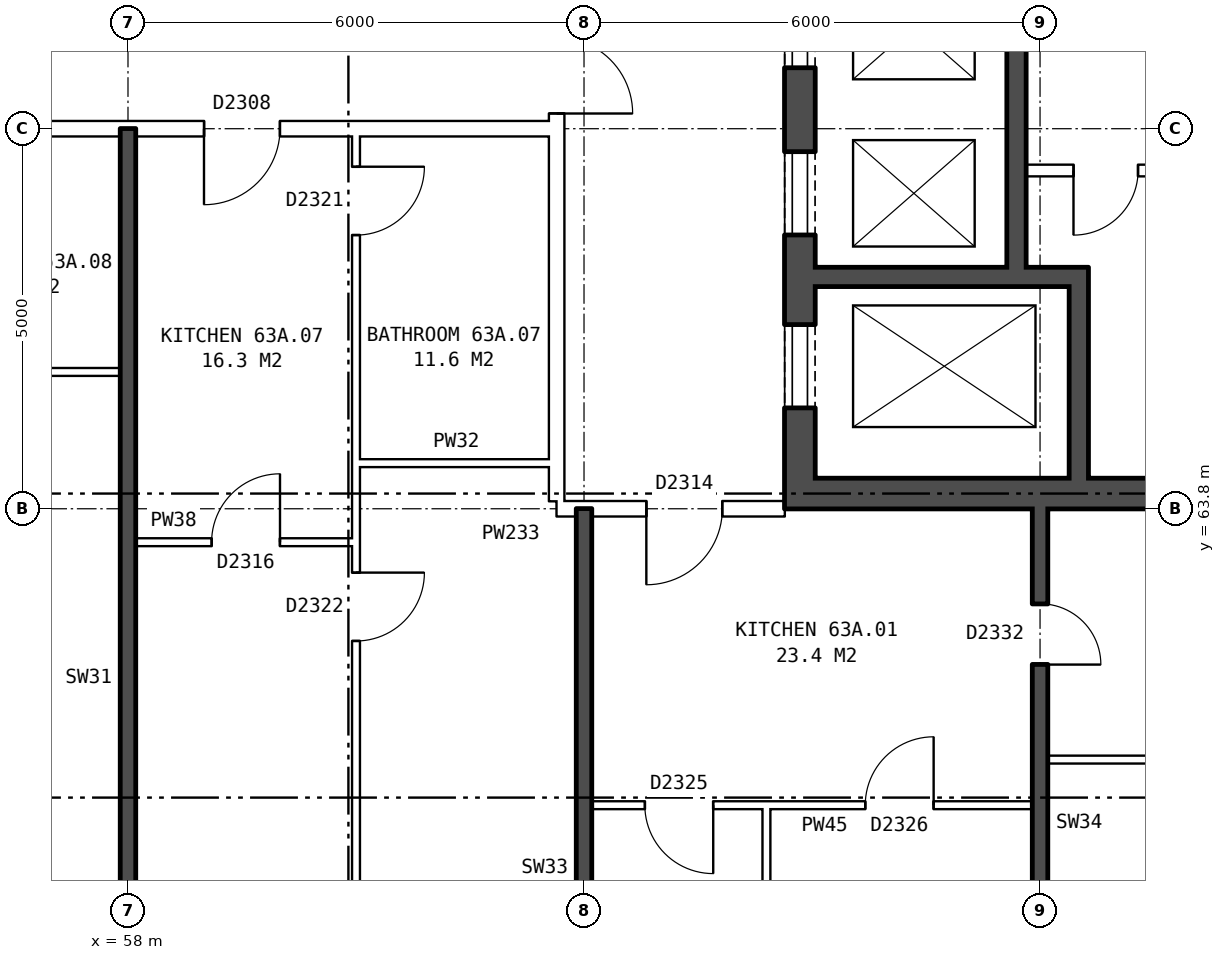
"""IFC4 building model, lengths in metres.
Left out: names, types, materials, properties, quantities, classifications, styles, units other than length and angle.
Written with IfcOpenShell. Run it as: python <this file> out.ifc"""

import sys

from ifc_helpers import new_model, si_unit, direction, frame, frame_2d, origin, place, context, subcontext, project, spatial, rectangle, extrude, element, fill, save


model = new_model("IFC4")
c1 = context("Model", 3, precision=1e-05, world=origin(), true_north=direction((0.0, 1.0)))
c2 = subcontext(c1, "Body", "Model", "MODEL_VIEW")
j1 = project(units=[si_unit("LENGTHUNIT", "METRE"), si_unit("PLANEANGLEUNIT", "RADIAN")], contexts=[c1])
p1 = place(None, origin())
s1 = spatial("IfcSite", under=j1, at=p1, CompositionType="ELEMENT")
p2 = place(p1, origin())
s2 = spatial("IfcBuilding", under=s1, at=p2, CompositionType="ELEMENT")
p3 = place(p2, frame((0.0, 0.0, 224.5)))
s3 = spatial("IfcBuildingStorey", under=s2, at=p3, CompositionType="ELEMENT", Elevation=224.5)
p4 = place(p3, frame((66.84, 63.8, 0.0), z_axis=(0.0, 0.0, 1.0), x_axis=(0.0, 1.0, 0.0)))
e1 = element("IfcWall", 1, at=p4, inside=s3, PredefinedType="SHEAR", context=c2, shape_type="SweptSolid", body=[
    extrude(rectangle(XDim=12.4, YDim=0.4, at=frame_2d((6.2, 0.0))), origin(), (0.0, 0.0, 1.0), 2.85),
])
p5 = place(p4, frame((1.325, 0.0, 0.0)))
e2 = element("IfcOpeningElement", 2, at=p5, cuts=e1, PredefinedType="OPENING", context=c2, shape_type="SweptSolid", body=[
    extrude(rectangle(XDim=1.1, YDim=2.1, at=frame_2d((0.55, 1.05))), frame((0.0, 0.21, 0.0), z_axis=(0.0, -1.0, 0.0), x_axis=(1.0, 0.0, 0.0)), (0.0, 0.0, 1.0), 0.42),
])
p6 = place(p4, frame((3.6, 0.0, 0.0)))
e3 = element("IfcOpeningElement", 3, at=p6, cuts=e1, PredefinedType="OPENING", context=c2, shape_type="SweptSolid", body=[
    extrude(rectangle(XDim=1.1, YDim=2.1, at=frame_2d((0.55, 1.05))), frame((0.0, 0.21, 0.0), z_axis=(0.0, -1.0, 0.0), x_axis=(1.0, 0.0, 0.0)), (0.0, 0.0, 1.0), 0.42),
])
p7 = place(p4, frame((5.8, 0.0, 0.0)))
e4 = element("IfcOpeningElement", 4, at=p7, cuts=e1, PredefinedType="OPENING", context=c2, shape_type="SweptSolid", body=[
    extrude(rectangle(XDim=1.1, YDim=2.1, at=frame_2d((0.55, 1.05))), frame((0.0, 0.21, 0.0), z_axis=(0.0, -1.0, 0.0), x_axis=(1.0, 0.0, 0.0)), (0.0, 0.0, 1.0), 0.42),
])
p8 = place(p4, frame((8.0, 0.0, 0.0)))
e5 = element("IfcOpeningElement", 5, at=p8, cuts=e1, PredefinedType="OPENING", context=c2, shape_type="SweptSolid", body=[
    extrude(rectangle(XDim=1.1, YDim=2.1, at=frame_2d((0.55, 1.05))), frame((0.0, 0.21, 0.0), z_axis=(0.0, -1.0, 0.0), x_axis=(1.0, 0.0, 0.0)), (0.0, 0.0, 1.0), 0.42),
])
p9 = place(p4, frame((9.9, 0.0, 0.0)))
e6 = element("IfcOpeningElement", 6, at=p9, cuts=e1, PredefinedType="OPENING", context=c2, shape_type="SweptSolid", body=[
    extrude(rectangle(XDim=1.1, YDim=2.1, at=frame_2d((0.55, 1.05))), frame((0.0, 0.21, 0.0), z_axis=(0.0, -1.0, 0.0), x_axis=(1.0, 0.0, 0.0)), (0.0, 0.0, 1.0), 0.42),
])
p10 = place(p3, frame((67.04, 64.0, 0.0), z_axis=(0.0, 0.0, 1.0), x_axis=(1.0, 0.0, 0.0)))
e7 = element("IfcWall", 7, at=p10, inside=s3, PredefinedType="SHEAR", context=c2, shape_type="SweptSolid", body=[
    extrude(rectangle(XDim=8.2, YDim=0.4, at=frame_2d((4.1, 0.0))), origin(), (0.0, 0.0, 1.0), 2.85),
])
p11 = place(p3, frame((67.04, 66.85, 0.0), z_axis=(0.0, 0.0, 1.0), x_axis=(1.0, 0.0, 0.0)))
e8 = element("IfcWall", 8, at=p11, inside=s3, PredefinedType="SHEAR", context=c2, shape_type="SweptSolid", body=[
    extrude(rectangle(XDim=3.595, YDim=0.25, at=frame_2d((1.797, 0.0))), origin(), (0.0, 0.0, 1.0), 2.85),
])
p12 = place(p3, frame((69.815, 68.25, 0.0), z_axis=(0.0, 0.0, 1.0), x_axis=(1.0, 0.0, 0.0)))
e9 = element("IfcWall", 9, at=p12, inside=s3, PredefinedType="PARTITIONING", context=c2, shape_type="SweptSolid", body=[
    extrude(rectangle(XDim=2.1, YDim=0.15, at=frame_2d((1.05, 0.0))), origin(), (0.0, 0.0, 1.0), 2.85),
])
p13 = place(p12, frame((0.625, 0.0, 0.0)))
e10 = element("IfcOpeningElement", 10, at=p13, cuts=e9, PredefinedType="OPENING", context=c2, shape_type="SweptSolid", body=[
    extrude(rectangle(XDim=0.85, YDim=2.1, at=frame_2d((0.425, 1.05))), frame((0.0, 0.085, 0.0), z_axis=(0.0, -1.0, 0.0), x_axis=(1.0, 0.0, 0.0)), (0.0, 0.0, 1.0), 0.17),
])
p14 = place(p3, frame((69.69, 66.975, 0.0), z_axis=(0.0, 0.0, 1.0), x_axis=(0.0, 1.0, 0.0)))
e11 = element("IfcWall", 11, at=p14, inside=s3, PredefinedType="SHEAR", context=c2, shape_type="SweptSolid", body=[
    extrude(rectangle(XDim=6.6, YDim=0.25, at=frame_2d((3.3, 0.0))), origin(), (0.0, 0.0, 1.0), 2.85),
])
p15 = place(p3, frame((70.51, 64.2, 0.0), z_axis=(0.0, 0.0, 1.0), x_axis=(0.0, 1.0, 0.0)))
e12 = element("IfcWall", 12, at=p15, inside=s3, PredefinedType="SHEAR", context=c2, shape_type="SweptSolid", body=[
    extrude(rectangle(XDim=2.525, YDim=0.25, at=frame_2d((1.263, 0.0))), origin(), (0.0, 0.0, 1.0), 2.85),
])
p16 = place(p3, frame((63.64, 63.9, 0.0), z_axis=(0.0, 0.0, 1.0), x_axis=(0.0, 1.0, 0.0)))
e13 = element("IfcWall", 13, at=p16, inside=s3, PredefinedType="PARTITIONING", context=c2, shape_type="SweptSolid", body=[
    extrude(rectangle(XDim=12.2, YDim=0.2, at=frame_2d((6.1, 0.0))), origin(), (0.0, 0.0, 1.0), 2.85),
])
p17 = place(p16, frame((5.1, 0.0, 0.0)))
e14 = element("IfcOpeningElement", 14, at=p17, cuts=e13, PredefinedType="OPENING", context=c2, shape_type="SweptSolid", body=[
    extrude(rectangle(XDim=2.0, YDim=2.1, at=frame_2d((1.0, 1.05))), frame((0.0, 0.11, 0.0), z_axis=(0.0, -1.0, 0.0), x_axis=(1.0, 0.0, 0.0)), (0.0, 0.0, 1.0), 0.22),
])
p18 = place(p3, frame((64.1, 59.9, 0.0), z_axis=(0.0, 0.0, 1.0), x_axis=(1.0, 0.0, 0.0)))
e15 = element("IfcWall", 15, at=p18, inside=s3, PredefinedType="PARTITIONING", context=c2, shape_type="SweptSolid", body=[
    extrude(rectangle(XDim=5.8, YDim=0.1, at=frame_2d((2.9, 0.0))), origin(), (0.0, 0.0, 1.0), 2.85),
])
p19 = place(p18, frame((3.6, 0.0, 0.0)))
e16 = element("IfcOpeningElement", 16, at=p19, cuts=e15, PredefinedType="OPENING", context=c2, shape_type="SweptSolid", body=[
    extrude(rectangle(XDim=0.9, YDim=2.1, at=frame_2d((0.45, 1.05))), frame((0.0, 0.06, 0.0), z_axis=(0.0, -1.0, 0.0), x_axis=(1.0, 0.0, 0.0)), (0.0, 0.0, 1.0), 0.12),
])
p20 = place(p18, frame((0.7, 0.0, 0.0)))
e17 = element("IfcOpeningElement", 17, at=p20, cuts=e15, PredefinedType="OPENING", context=c2, shape_type="SweptSolid", body=[
    extrude(rectangle(XDim=0.9, YDim=2.1, at=frame_2d((0.45, 1.05))), frame((0.0, 0.06, 0.0), z_axis=(0.0, -1.0, 0.0), x_axis=(1.0, 0.0, 0.0)), (0.0, 0.0, 1.0), 0.12),
])
p21 = place(p3, frame((70.1, 60.5, 0.0), z_axis=(0.0, 0.0, 1.0), x_axis=(1.0, 0.0, 0.0)))
e18 = element("IfcWall", 18, at=p21, inside=s3, PredefinedType="PARTITIONING", context=c2, shape_type="SweptSolid", body=[
    extrude(rectangle(XDim=5.8, YDim=0.1, at=frame_2d((2.9, 0.0))), origin(), (0.0, 0.0, 1.0), 2.85),
])
p22 = place(p3, frame((58.1, 63.36, 0.0), z_axis=(0.0, 0.0, 1.0), x_axis=(1.0, 0.0, 0.0)))
e19 = element("IfcWall", 19, at=p22, inside=s3, PredefinedType="PARTITIONING", context=c2, shape_type="SweptSolid", body=[
    extrude(rectangle(XDim=2.9, YDim=0.1, at=frame_2d((1.45, 0.0))), origin(), (0.0, 0.0, 1.0), 2.85),
])
p23 = place(p22, frame((1.0, 0.0, 0.0)))
e20 = element("IfcOpeningElement", 20, at=p23, cuts=e19, PredefinedType="OPENING", context=c2, shape_type="SweptSolid", body=[
    extrude(rectangle(XDim=0.9, YDim=2.1, at=frame_2d((0.45, 1.05))), frame((0.0, 0.06, 0.0), z_axis=(0.0, -1.0, 0.0), x_axis=(1.0, 0.0, 0.0)), (0.0, 0.0, 1.0), 0.12),
])
p24 = place(p3, frame((63.64, 63.8, 0.0), z_axis=(0.0, 0.0, 1.0), x_axis=(1.0, 0.0, 0.0)))
e21 = element("IfcWall", 21, at=p24, inside=s3, PredefinedType="PARTITIONING", context=c2, shape_type="SweptSolid", body=[
    extrude(rectangle(XDim=3.0, YDim=0.2, at=frame_2d((1.5, 0.0))), origin(), (0.0, 0.0, 1.0), 2.85),
])
p25 = place(p24, frame((1.18, 0.0, 0.0)))
e22 = element("IfcOpeningElement", 22, at=p25, cuts=e21, PredefinedType="OPENING", context=c2, shape_type="SweptSolid", body=[
    extrude(rectangle(XDim=1.0, YDim=2.1, at=frame_2d((0.5, 1.05))), frame((0.0, 0.11, 0.0), z_axis=(0.0, -1.0, 0.0), x_axis=(1.0, 0.0, 0.0)), (0.0, 0.0, 1.0), 0.22),
])
p26 = place(p3, frame((61.0, 64.4, 0.0), z_axis=(0.0, 0.0, 1.0), x_axis=(1.0, 0.0, 0.0)))
e23 = element("IfcWall", 23, at=p26, inside=s3, PredefinedType="PARTITIONING", context=c2, shape_type="SweptSolid", body=[
    extrude(rectangle(XDim=2.64, YDim=0.1, at=frame_2d((1.32, 0.0))), origin(), (0.0, 0.0, 1.0), 2.85),
])
p27 = place(p3, frame((55.0, 65.6, 0.0), z_axis=(0.0, 0.0, 1.0), x_axis=(1.0, 0.0, 0.0)))
e24 = element("IfcWall", 24, at=p27, inside=s3, PredefinedType="PARTITIONING", context=c2, shape_type="SweptSolid", body=[
    extrude(rectangle(XDim=2.9, YDim=0.1, at=frame_2d((1.45, 0.0))), origin(), (0.0, 0.0, 1.0), 2.85),
])
p28 = place(p3, frame((44.36, 68.8, 0.0), z_axis=(0.0, 0.0, 1.0), x_axis=(1.0, 0.0, 0.0)))
e25 = element("IfcWall", 25, at=p28, inside=s3, PredefinedType="PARTITIONING", context=c2, shape_type="SweptSolid", body=[
    extrude(rectangle(XDim=19.28, YDim=0.2, at=frame_2d((9.64, 0.0))), origin(), (0.0, 0.0, 1.0), 2.85),
])
p29 = place(p28, frame((14.64, 0.0, 0.0)))
e26 = element("IfcOpeningElement", 26, at=p29, cuts=e25, PredefinedType="OPENING", context=c2, shape_type="SweptSolid", body=[
    extrude(rectangle(XDim=1.0, YDim=2.1, at=frame_2d((0.5, 1.05))), frame((0.0, 0.11, 0.0), z_axis=(0.0, -1.0, 0.0), x_axis=(1.0, 0.0, 0.0)), (0.0, 0.0, 1.0), 0.22),
])
p30 = place(p28, frame((8.64, 0.0, 0.0)))
e27 = element("IfcOpeningElement", 27, at=p30, cuts=e25, PredefinedType="OPENING", context=c2, shape_type="SweptSolid", body=[
    extrude(rectangle(XDim=1.0, YDim=2.1, at=frame_2d((0.5, 1.05))), frame((0.0, 0.11, 0.0), z_axis=(0.0, -1.0, 0.0), x_axis=(1.0, 0.0, 0.0)), (0.0, 0.0, 1.0), 0.22),
])
p31 = place(p28, frame((5.64, 0.0, 0.0)))
e28 = element("IfcOpeningElement", 28, at=p31, cuts=e25, PredefinedType="OPENING", context=c2, shape_type="SweptSolid", body=[
    extrude(rectangle(XDim=1.0, YDim=2.1, at=frame_2d((0.5, 1.05))), frame((0.0, 0.11, 0.0), z_axis=(0.0, -1.0, 0.0), x_axis=(1.0, 0.0, 0.0)), (0.0, 0.0, 1.0), 0.22),
])
p32 = place(p3, frame((58.0, 54.36, 0.0), z_axis=(0.0, 0.0, 1.0), x_axis=(0.0, 1.0, 0.0)))
e29 = element("IfcWall", 29, at=p32, inside=s3, PredefinedType="SOLIDWALL", context=c2, shape_type="SweptSolid", body=[
    extrude(rectangle(XDim=14.44, YDim=0.2, at=frame_2d((7.22, 0.0))), origin(), (0.0, 0.0, 1.0), 2.85),
])
p33 = place(p3, frame((61.0, 54.36, 0.0), z_axis=(0.0, 0.0, 1.0), x_axis=(0.0, 1.0, 0.0)))
e30 = element("IfcWall", 30, at=p33, inside=s3, PredefinedType="PARTITIONING", context=c2, shape_type="SweptSolid", body=[
    extrude(rectangle(XDim=14.34, YDim=0.1, at=frame_2d((7.17, 0.0))), origin(), (0.0, 0.0, 1.0), 2.85),
])
p34 = place(p33, frame((7.7, 0.0, 0.0)))
e31 = element("IfcOpeningElement", 31, at=p34, cuts=e30, PredefinedType="OPENING", context=c2, shape_type="SweptSolid", body=[
    extrude(rectangle(XDim=0.9, YDim=2.1, at=frame_2d((0.45, 1.05))), frame((0.0, 0.06, 0.0), z_axis=(0.0, -1.0, 0.0), x_axis=(1.0, 0.0, 0.0)), (0.0, 0.0, 1.0), 0.12),
])
p35 = place(p33, frame((13.04, 0.0, 0.0)))
e32 = element("IfcOpeningElement", 32, at=p35, cuts=e30, PredefinedType="OPENING", context=c2, shape_type="SweptSolid", body=[
    extrude(rectangle(XDim=0.9, YDim=2.1, at=frame_2d((0.45, 1.05))), frame((0.0, 0.06, 0.0), z_axis=(0.0, -1.0, 0.0), x_axis=(1.0, 0.0, 0.0)), (0.0, 0.0, 1.0), 0.12),
])
p36 = place(p3, frame((64.0, 54.36, 0.0), z_axis=(0.0, 0.0, 1.0), x_axis=(0.0, 1.0, 0.0)))
e33 = element("IfcWall", 33, at=p36, inside=s3, PredefinedType="SOLIDWALL", context=c2, shape_type="SweptSolid", body=[
    extrude(rectangle(XDim=9.44, YDim=0.2, at=frame_2d((4.72, 0.0))), origin(), (0.0, 0.0, 1.0), 2.85),
])
p37 = place(p3, frame((66.4, 57.45, 0.0), z_axis=(0.0, 0.0, 1.0), x_axis=(0.0, 1.0, 0.0)))
e34 = element("IfcWall", 34, at=p37, inside=s3, PredefinedType="PARTITIONING", context=c2, shape_type="SweptSolid", body=[
    extrude(rectangle(XDim=2.4, YDim=0.1, at=frame_2d((1.2, 0.0))), origin(), (0.0, 0.0, 1.0), 2.85),
])
p38 = place(p3, frame((70.0, 54.36, 0.0), z_axis=(0.0, 0.0, 1.0), x_axis=(0.0, 1.0, 0.0)))
e35 = element("IfcWall", 35, at=p38, inside=s3, PredefinedType="SOLIDWALL", context=c2, shape_type="SweptSolid", body=[
    extrude(rectangle(XDim=9.44, YDim=0.2, at=frame_2d((4.72, 0.0))), origin(), (0.0, 0.0, 1.0), 2.85),
])
p39 = place(p38, frame((2.32, 0.0, 0.0)))
e36 = element("IfcOpeningElement", 36, at=p39, cuts=e35, PredefinedType="OPENING", context=c2, shape_type="SweptSolid", body=[
    extrude(rectangle(XDim=0.9, YDim=2.1, at=frame_2d((0.45, 1.05))), frame((0.0, 0.11, 0.0), z_axis=(0.0, -1.0, 0.0), x_axis=(1.0, 0.0, 0.0)), (0.0, 0.0, 1.0), 0.22),
])
p40 = place(p38, frame((7.39, 0.0, 0.0)))
e37 = element("IfcOpeningElement", 37, at=p40, cuts=e35, PredefinedType="OPENING", context=c2, shape_type="SweptSolid", body=[
    extrude(rectangle(XDim=0.8, YDim=2.1, at=frame_2d((0.4, 1.05))), frame((0.0, 0.11, 0.0), z_axis=(0.0, -1.0, 0.0), x_axis=(1.0, 0.0, 0.0)), (0.0, 0.0, 1.0), 0.22),
])
p41 = place(p5, origin())
e38 = element("IfcDoor", 38, at=p41, inside=s3, OperationType="DOUBLE_DOOR_SLIDING", PredefinedType="DOOR", context=c2, shape_type="SweptSolid", body=[
    extrude(rectangle(XDim=1.1, YDim=2.1, at=frame_2d((0.55, 1.05))), frame((0.0, -0.135, 0.0), z_axis=(0.0, -1.0, 0.0), x_axis=(1.0, 0.0, 0.0)), (0.0, 0.0, 1.0), 0.05),
])
fill(e2, e38)
p42 = place(p6, origin())
e39 = element("IfcDoor", 39, at=p42, inside=s3, OperationType="DOUBLE_DOOR_SLIDING", PredefinedType="DOOR", context=c2, shape_type="SweptSolid", body=[
    extrude(rectangle(XDim=1.1, YDim=2.1, at=frame_2d((0.55, 1.05))), frame((0.0, -0.135, 0.0), z_axis=(0.0, -1.0, 0.0), x_axis=(1.0, 0.0, 0.0)), (0.0, 0.0, 1.0), 0.05),
])
fill(e3, e39)
p43 = place(p7, origin())
e40 = element("IfcDoor", 40, at=p43, inside=s3, OperationType="DOUBLE_DOOR_SLIDING", PredefinedType="DOOR", context=c2, shape_type="SweptSolid", body=[
    extrude(rectangle(XDim=1.1, YDim=2.1, at=frame_2d((0.55, 1.05))), frame((0.0, -0.135, 0.0), z_axis=(0.0, -1.0, 0.0), x_axis=(1.0, 0.0, 0.0)), (0.0, 0.0, 1.0), 0.05),
])
fill(e4, e40)
p44 = place(p13, frame((0.85, 0.0, 0.0), z_axis=(0.0, 0.0, 1.0), x_axis=(-1.0, 0.0, 0.0)))
e41 = element("IfcDoor", 41, at=p44, inside=s3, OperationType="SINGLE_SWING_RIGHT", PredefinedType="DOOR", context=c2, shape_type="SweptSolid", body=[
    extrude(rectangle(XDim=0.85, YDim=2.1, at=frame_2d((0.425, 1.05))), frame((0.0, 0.025, 0.0), z_axis=(0.0, -1.0, 0.0), x_axis=(1.0, 0.0, 0.0)), (0.0, 0.0, 1.0), 0.05),
])
fill(e10, e41)
p45 = place(p17, frame((2.0, 0.0, 0.0), z_axis=(0.0, 0.0, 1.0), x_axis=(-1.0, 0.0, 0.0)))
e42 = element("IfcDoor", 42, at=p45, inside=s3, OperationType="DOUBLE_DOOR_SINGLE_SWING", PredefinedType="DOOR", context=c2, shape_type="SweptSolid", body=[
    extrude(rectangle(XDim=2.0, YDim=2.1, at=frame_2d((1.0, 1.05))), frame((0.0, 0.025, 0.0), z_axis=(0.0, -1.0, 0.0), x_axis=(1.0, 0.0, 0.0)), (0.0, 0.0, 1.0), 0.05),
])
fill(e14, e42)
p46 = place(p25, frame((1.0, 0.0, 0.0), z_axis=(0.0, 0.0, 1.0), x_axis=(-1.0, 0.0, 0.0)))
e43 = element("IfcDoor", 43, at=p46, inside=s3, OperationType="SINGLE_SWING_RIGHT", PredefinedType="DOOR", context=c2, shape_type="SweptSolid", body=[
    extrude(rectangle(XDim=1.0, YDim=2.1, at=frame_2d((0.5, 1.05))), frame((0.0, 0.025, 0.0), z_axis=(0.0, -1.0, 0.0), x_axis=(1.0, 0.0, 0.0)), (0.0, 0.0, 1.0), 0.05),
])
fill(e22, e43)
p47 = place(p19, origin())
e44 = element("IfcDoor", 44, at=p47, inside=s3, OperationType="SINGLE_SWING_RIGHT", PredefinedType="DOOR", context=c2, shape_type="SweptSolid", body=[
    extrude(rectangle(XDim=0.9, YDim=2.1, at=frame_2d((0.45, 1.05))), frame((0.0, 0.025, 0.0), z_axis=(0.0, -1.0, 0.0), x_axis=(1.0, 0.0, 0.0)), (0.0, 0.0, 1.0), 0.05),
])
fill(e16, e44)
p48 = place(p40, frame((0.8, 0.0, 0.0), z_axis=(0.0, 0.0, 1.0), x_axis=(-1.0, 0.0, 0.0)))
e45 = element("IfcDoor", 45, at=p48, inside=s3, OperationType="SINGLE_SWING_RIGHT", PredefinedType="DOOR", context=c2, shape_type="SweptSolid", body=[
    extrude(rectangle(XDim=0.8, YDim=2.1, at=frame_2d((0.4, 1.05))), frame((0.0, 0.025, 0.0), z_axis=(0.0, -1.0, 0.0), x_axis=(1.0, 0.0, 0.0)), (0.0, 0.0, 1.0), 0.05),
])
fill(e37, e45)
p49 = place(p20, frame((0.9, 0.0, 0.0), z_axis=(0.0, 0.0, 1.0), x_axis=(-1.0, 0.0, 0.0)))
e46 = element("IfcDoor", 46, at=p49, inside=s3, OperationType="SINGLE_SWING_LEFT", PredefinedType="DOOR", context=c2, shape_type="SweptSolid", body=[
    extrude(rectangle(XDim=0.9, YDim=2.1, at=frame_2d((0.45, 1.05))), frame((0.0, 0.025, 0.0), z_axis=(0.0, -1.0, 0.0), x_axis=(1.0, 0.0, 0.0)), (0.0, 0.0, 1.0), 0.05),
])
fill(e17, e46)
p50 = place(p34, frame((0.9, 0.0, 0.0), z_axis=(0.0, 0.0, 1.0), x_axis=(-1.0, 0.0, 0.0)))
e47 = element("IfcDoor", 47, at=p50, inside=s3, OperationType="SINGLE_SWING_LEFT", PredefinedType="DOOR", context=c2, shape_type="SweptSolid", body=[
    extrude(rectangle(XDim=0.9, YDim=2.1, at=frame_2d((0.45, 1.05))), frame((0.0, 0.025, 0.0), z_axis=(0.0, -1.0, 0.0), x_axis=(1.0, 0.0, 0.0)), (0.0, 0.0, 1.0), 0.05),
])
fill(e31, e47)
p51 = place(p29, frame((1.0, 0.0, 0.0), z_axis=(0.0, 0.0, 1.0), x_axis=(-1.0, 0.0, 0.0)))
e48 = element("IfcDoor", 48, at=p51, inside=s3, OperationType="SINGLE_SWING_RIGHT", PredefinedType="DOOR", context=c2, shape_type="SweptSolid", body=[
    extrude(rectangle(XDim=1.0, YDim=2.1, at=frame_2d((0.5, 1.05))), frame((0.0, 0.025, 0.0), z_axis=(0.0, -1.0, 0.0), x_axis=(1.0, 0.0, 0.0)), (0.0, 0.0, 1.0), 0.05),
])
fill(e26, e48)
p52 = place(p23, origin())
e49 = element("IfcDoor", 49, at=p52, inside=s3, OperationType="SINGLE_SWING_RIGHT", PredefinedType="DOOR", context=c2, shape_type="SweptSolid", body=[
    extrude(rectangle(XDim=0.9, YDim=2.1, at=frame_2d((0.45, 1.05))), frame((0.0, 0.025, 0.0), z_axis=(0.0, -1.0, 0.0), x_axis=(1.0, 0.0, 0.0)), (0.0, 0.0, 1.0), 0.05),
])
fill(e20, e49)
p53 = place(p35, frame((0.9, 0.0, 0.0), z_axis=(0.0, 0.0, 1.0), x_axis=(-1.0, 0.0, 0.0)))
e50 = element("IfcDoor", 50, at=p53, inside=s3, OperationType="SINGLE_SWING_LEFT", PredefinedType="DOOR", context=c2, shape_type="SweptSolid", body=[
    extrude(rectangle(XDim=0.9, YDim=2.1, at=frame_2d((0.45, 1.05))), frame((0.0, 0.025, 0.0), z_axis=(0.0, -1.0, 0.0), x_axis=(1.0, 0.0, 0.0)), (0.0, 0.0, 1.0), 0.05),
])
fill(e32, e50)
save(model, sys.argv[1])
